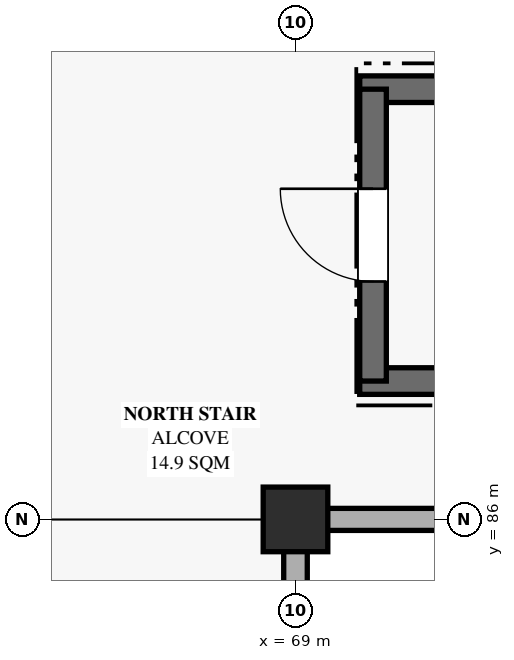
"""IFC4 building model, lengths in metres.
Left out: names, types, materials, properties, quantities, classifications, styles, units other than length and angle.
Written with IfcOpenShell. Run it as: python <this file> out.ifc"""

import sys

from ifc_helpers import new_model, si_unit, direction, frame, frame_2d, origin, origin_2d, place, context, subcontext, project, spatial, rectangle, extrude, element, fill, save


model = new_model("IFC4")
c1 = context("Model", 3, precision=1e-05, world=origin(), true_north=direction((0.0, 1.0)))
c2 = subcontext(c1, "Body", "Model", "MODEL_VIEW")
j1 = project(units=[si_unit("LENGTHUNIT", "METRE"), si_unit("PLANEANGLEUNIT", "RADIAN")], contexts=[c1])
p1 = place(None, origin())
s1 = spatial("IfcSite", under=j1, at=p1, CompositionType="ELEMENT")
p2 = place(p1, origin())
s2 = spatial("IfcBuilding", under=s1, at=p2, CompositionType="ELEMENT")
p3 = place(p2, origin())
s3 = spatial("IfcBuildingStorey", under=s2, at=p3, CompositionType="ELEMENT", Elevation=0.0)
p4 = place(p3, frame((69.0, 86.0, 0.0), z_axis=(0.0, 0.0, 1.0), x_axis=(1.0, 0.0, 0.0)))
e1 = element("IfcColumn", 1, at=p4, inside=s3, PredefinedType="COLUMN", context=c2, shape_type="SweptSolid", body=[
    extrude(rectangle(XDim=0.85, YDim=0.85, at=origin_2d()), origin(), (0.0, 0.0, 1.0), 5.4),
])
p5 = place(p3, frame((69.0, 85.59, 0.0), z_axis=(0.0, 0.0, 1.0), x_axis=(0.0, -1.0, 0.0)))
e2 = element("IfcWall", 2, at=p5, inside=s3, PredefinedType="SOLIDWALL", context=c2, shape_type="SweptSolid", body=[
    extrude(rectangle(XDim=6.38, YDim=0.31, at=frame_2d((3.19, 0.0))), origin(), (0.0, 0.0, 1.0), 3.9),
])
p6 = place(p5, frame((2.34, 0.0, 0.9)))
e3 = element("IfcOpeningElement", 3, at=p6, cuts=e2, PredefinedType="OPENING", context=c2, shape_type="SweptSolid", body=[
    extrude(rectangle(XDim=1.7, YDim=2.0, at=frame_2d((0.85, 1.0))), frame((0.0, 0.165, 0.0), z_axis=(0.0, -1.0, 0.0), x_axis=(1.0, 0.0, 0.0)), (0.0, 0.0, 1.0), 0.33),
])
p7 = place(p3, frame((75.79, 86.0, 0.0), z_axis=(0.0, 0.0, 1.0), x_axis=(-1.0, 0.0, 0.0)))
e4 = element("IfcWall", 4, at=p7, inside=s3, PredefinedType="SOLIDWALL", context=c2, shape_type="SweptSolid", body=[
    extrude(rectangle(XDim=6.38, YDim=0.29, at=frame_2d((3.19, 0.0))), origin(), (0.0, 0.0, 1.0), 3.9),
])
p8 = place(p7, frame((2.54, 0.0, 0.9)))
e5 = element("IfcOpeningElement", 5, at=p8, cuts=e4, PredefinedType="OPENING", context=c2, shape_type="SweptSolid", body=[
    extrude(rectangle(XDim=1.3, YDim=1.9, at=frame_2d((0.65, 0.95))), frame((0.0, 0.155, 0.0), z_axis=(0.0, -1.0, 0.0), x_axis=(1.0, 0.0, 0.0)), (0.0, 0.0, 1.0), 0.31),
])
for number, where, z_axis, x_axis in (
    (6, (77.855, 87.82, 0.0), (0.0, 0.0, 1.0), (-1.0, 0.0, 0.0)),
    (7, (69.845, 91.66, 0.0), (0.0, 0.0, 1.0), (1.0, 0.0, 0.0)),
):
    element("IfcWall", number, at=place(p3, frame(where, z_axis=z_axis, x_axis=x_axis)), inside=s3, PredefinedType="SHEAR", context=c2, shape_type="SweptSolid", body=[
        extrude(rectangle(XDim=8.01, YDim=0.35, at=frame_2d((4.005, 0.0))), origin(), (0.0, 0.0, 1.0), 5.13),
    ])
p9 = place(p3, frame((70.02, 87.82, 0.0), z_axis=(0.0, 0.0, 1.0), x_axis=(0.0, 1.0, 0.0)))
e8 = element("IfcWall", 8, at=p9, inside=s3, PredefinedType="SHEAR", context=c2, shape_type="SweptSolid", body=[
    extrude(rectangle(XDim=3.84, YDim=0.35, at=frame_2d((1.92, 0.0))), origin(), (0.0, 0.0, 1.0), 5.13),
])
p10 = place(p9, frame((1.31, 0.0, 0.0)))
e9 = element("IfcOpeningElement", 9, at=p10, cuts=e8, PredefinedType="OPENING", context=c2, shape_type="SweptSolid", body=[
    extrude(rectangle(XDim=1.22, YDim=2.06, at=frame_2d((0.61, 1.03))), frame((0.0, 0.185, 0.0), z_axis=(0.0, -1.0, 0.0), x_axis=(1.0, 0.0, 0.0)), (0.0, 0.0, 1.0), 0.37),
])
p11 = place(p10, origin())
e10 = element("IfcDoor", 10, at=p11, inside=s3, OperationType="SINGLE_SWING_RIGHT", PredefinedType="DOOR", context=c2, shape_type="SweptSolid", body=[
    extrude(rectangle(XDim=1.22, YDim=2.06, at=frame_2d((0.61, 1.03))), frame((0.0, 0.025, 0.0), z_axis=(0.0, -1.0, 0.0), x_axis=(1.0, 0.0, 0.0)), (0.0, 0.0, 1.0), 0.05),
])
fill(e9, e10)
save(model, sys.argv[1])
